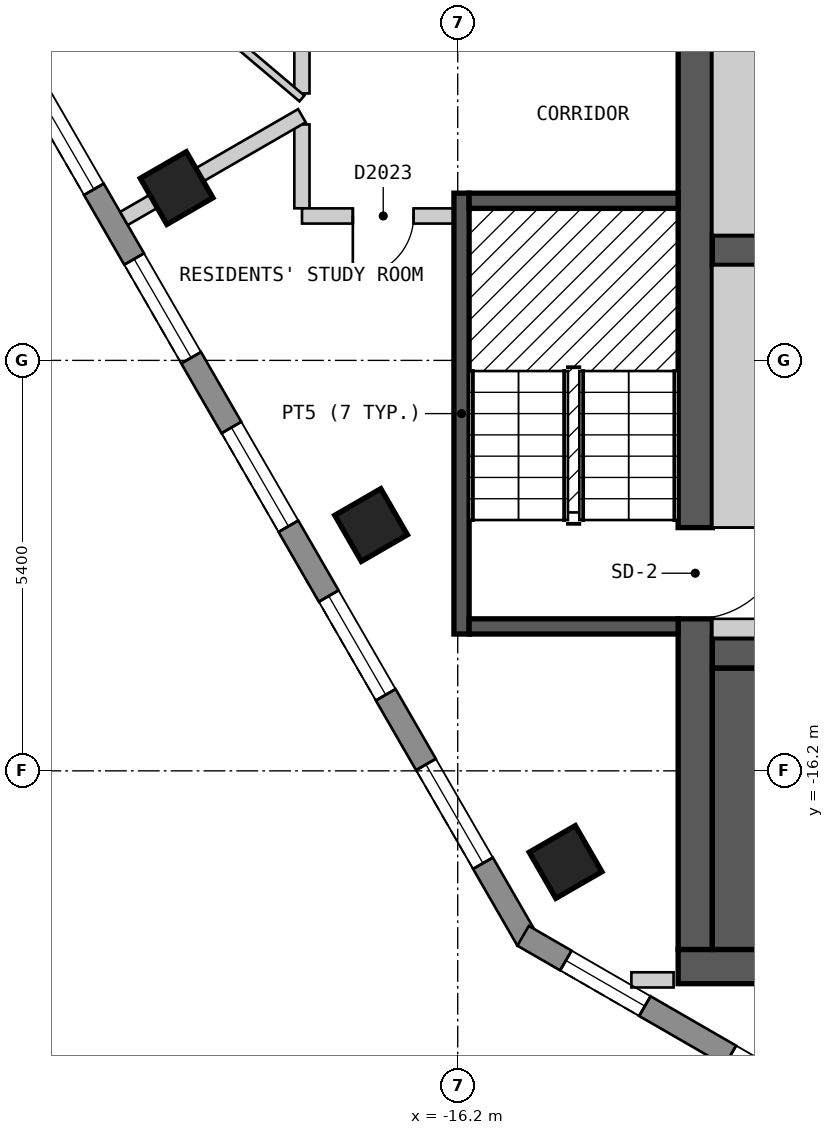
"""IFC4 building model, lengths in metres.
Left out: names, types, materials, properties, quantities, classifications, styles, units other than length and angle.
Written with IfcOpenShell. Run it as: python <this file> out.ifc"""

import sys

from ifc_helpers import new_model, si_unit, direction, frame, frame_2d, origin, origin_2d, place, context, subcontext, project, spatial, polyline, rectangle, outline, extrude, element, fill, save


model = new_model("IFC4")
c1 = context("Model", 3, precision=1e-05, world=origin(), true_north=direction((0.0, 1.0)))
c2 = subcontext(c1, "Body", "Model", "MODEL_VIEW")
j1 = project(units=[si_unit("LENGTHUNIT", "METRE"), si_unit("PLANEANGLEUNIT", "RADIAN")], contexts=[c1])
p1 = place(None, origin())
s1 = spatial("IfcSite", under=j1, at=p1, CompositionType="ELEMENT")
p2 = place(p1, origin())
s2 = spatial("IfcBuilding", under=s1, at=p2, CompositionType="ELEMENT")
p3 = place(p2, frame((0.0, 0.0, 238.8)))
s3 = spatial("IfcBuildingStorey", under=s2, at=p3, CompositionType="ELEMENT", Elevation=238.8)
for number, where, z_axis, x_axis in (
    (1, (-19.899, -8.533, 0.0), (0.0, 0.0, 1.0), (0.5, -0.866, 0.0)),
    (2, (-17.34, -12.966, 0.0), (0.0, 0.0, 1.0), (0.5, -0.866, 0.0)),
    (3, (-14.781, -17.399, 0.0), (0.0, 0.0, 1.0), (0.5, -0.866, 0.0)),
):
    element("IfcColumn", number, at=place(p3, frame(where, z_axis=z_axis, x_axis=x_axis)), inside=s3, PredefinedType="COLUMN", context=c2, shape_type="SweptSolid", body=[
        extrude(rectangle(XDim=0.7, YDim=0.7, at=origin_2d()), origin(), (0.0, 0.0, 1.0), 3.0),
    ])
p4 = place(p3, frame((-13.3, -18.775, 0.0), z_axis=(0.0, 0.0, 1.0), x_axis=(1.0, 0.0, 0.0)))
e4 = element("IfcWall", 4, at=p4, inside=s3, PredefinedType="SHEAR", context=c2, shape_type="SweptSolid", body=[
    extrude(rectangle(XDim=26.6, YDim=0.45, at=frame_2d((13.3, 0.0))), origin(), (0.0, 0.0, 1.0), 2.7),
])
p5 = place(p4, frame((10.25, 0.0, 0.0)))
e5 = element("IfcOpeningElement", 5, at=p5, cuts=e4, PredefinedType="OPENING", context=c2, shape_type="SweptSolid", body=[
    extrude(rectangle(XDim=0.9, YDim=2.1, at=frame_2d((0.45, 1.05))), frame((0.0, 0.235, 0.0), z_axis=(0.0, -1.0, 0.0), x_axis=(1.0, 0.0, 0.0)), (0.0, 0.0, 1.0), 0.47),
])
p6 = place(p3, frame((-13.075, -18.55, 0.0), z_axis=(0.0, 0.0, 1.0), x_axis=(0.0, 1.0, 0.0)))
e6 = element("IfcWall", 6, at=p6, inside=s3, PredefinedType="SHEAR", context=c2, shape_type="SweptSolid", body=[
    extrude(rectangle(XDim=13.1, YDim=0.45, at=frame_2d((6.55, 0.0))), origin(), (0.0, 0.0, 1.0), 2.7),
])
p7 = place(p6, frame((4.35, 0.0, 0.0)))
e7 = element("IfcOpeningElement", 7, at=p7, cuts=e6, PredefinedType="OPENING", context=c2, shape_type="SweptSolid", body=[
    extrude(rectangle(XDim=1.2, YDim=2.1, at=frame_2d((0.6, 1.05))), frame((0.0, 0.235, 0.0), z_axis=(0.0, -1.0, 0.0), x_axis=(1.0, 0.0, 0.0)), (0.0, 0.0, 1.0), 0.47),
])
p8 = place(p3, frame((-12.85, -14.65, 0.0), z_axis=(0.0, 0.0, 1.0), x_axis=(1.0, 0.0, 0.0)))
e8 = element("IfcWall", 8, at=p8, inside=s3, PredefinedType="SHEAR", context=c2, shape_type="SweptSolid", body=[
    extrude(rectangle(XDim=25.7, YDim=0.4, at=frame_2d((12.85, 0.0))), origin(), (0.0, 0.0, 1.0), 2.7),
])
p9 = place(p8, frame((2.05, 0.0, 0.0), z_axis=(0.0, 0.0, 1.0), x_axis=(-1.0, 0.0, 0.0)))
e9 = element("IfcOpeningElement", 9, at=p9, cuts=e8, PredefinedType="OPENING", context=c2, shape_type="SweptSolid", body=[
    extrude(rectangle(XDim=1.2, YDim=2.1, at=frame_2d((0.6, 1.05))), frame((0.0, 0.21, 0.0), z_axis=(0.0, -1.0, 0.0), x_axis=(1.0, 0.0, 0.0)), (0.0, 0.0, 1.0), 0.42),
])
p10 = place(p8, frame((24.9, 0.0, 0.0), z_axis=(0.0, 0.0, 1.0), x_axis=(-1.0, 0.0, 0.0)))
e10 = element("IfcOpeningElement", 10, at=p10, cuts=e8, PredefinedType="OPENING", context=c2, shape_type="SweptSolid", body=[
    extrude(rectangle(XDim=1.2, YDim=2.1, at=frame_2d((0.6, 1.05))), frame((0.0, 0.21, 0.0), z_axis=(0.0, -1.0, 0.0), x_axis=(1.0, 0.0, 0.0)), (0.0, 0.0, 1.0), 0.42),
])
p11 = place(p8, frame((10.0, 0.0, 0.0), z_axis=(0.0, 0.0, 1.0), x_axis=(-1.0, 0.0, 0.0)))
e11 = element("IfcOpeningElement", 11, at=p11, cuts=e8, PredefinedType="OPENING", context=c2, shape_type="SweptSolid", body=[
    extrude(rectangle(XDim=1.0, YDim=2.1, at=frame_2d((0.5, 1.05))), frame((0.0, 0.21, 0.0), z_axis=(0.0, -1.0, 0.0), x_axis=(1.0, 0.0, 0.0)), (0.0, 0.0, 1.0), 0.42),
])
p12 = place(p8, frame((16.4, 0.0, 0.0), z_axis=(0.0, 0.0, 1.0), x_axis=(-1.0, 0.0, 0.0)))
e12 = element("IfcOpeningElement", 12, at=p12, cuts=e8, PredefinedType="OPENING", context=c2, shape_type="SweptSolid", body=[
    extrude(rectangle(XDim=1.0, YDim=2.1, at=frame_2d((0.5, 1.05))), frame((0.0, 0.21, 0.0), z_axis=(0.0, -1.0, 0.0), x_axis=(1.0, 0.0, 0.0)), (0.0, 0.0, 1.0), 0.42),
])
p13 = place(p3, frame((-12.85, -9.35, 0.0), z_axis=(0.0, 0.0, 1.0), x_axis=(1.0, 0.0, 0.0)))
e13 = element("IfcWall", 13, at=p13, inside=s3, PredefinedType="SHEAR", context=c2, shape_type="SweptSolid", body=[
    extrude(rectangle(XDim=23.05, YDim=0.4, at=frame_2d((11.525, 0.0))), origin(), (0.0, 0.0, 1.0), 2.7),
])
p14 = place(p13, frame((1.45, 0.0, 0.0)))
e14 = element("IfcOpeningElement", 14, at=p14, cuts=e13, PredefinedType="OPENING", context=c2, shape_type="SweptSolid", body=[
    extrude(rectangle(XDim=1.1, YDim=2.1, at=frame_2d((0.55, 1.05))), frame((0.0, 0.21, 0.0), z_axis=(0.0, -1.0, 0.0), x_axis=(1.0, 0.0, 0.0)), (0.0, 0.0, 1.0), 0.42),
])
p15 = place(p13, frame((4.25, 0.0, 0.0)))
e15 = element("IfcOpeningElement", 15, at=p15, cuts=e13, PredefinedType="OPENING", context=c2, shape_type="SweptSolid", body=[
    extrude(rectangle(XDim=1.1, YDim=2.1, at=frame_2d((0.55, 1.05))), frame((0.0, 0.21, 0.0), z_axis=(0.0, -1.0, 0.0), x_axis=(1.0, 0.0, 0.0)), (0.0, 0.0, 1.0), 0.42),
])
p16 = place(p13, frame((7.05, 0.0, 0.0)))
e16 = element("IfcOpeningElement", 16, at=p16, cuts=e13, PredefinedType="OPENING", context=c2, shape_type="SweptSolid", body=[
    extrude(rectangle(XDim=1.1, YDim=2.1, at=frame_2d((0.55, 1.05))), frame((0.0, 0.21, 0.0), z_axis=(0.0, -1.0, 0.0), x_axis=(1.0, 0.0, 0.0)), (0.0, 0.0, 1.0), 0.42),
])
p17 = place(p13, frame((9.35, 0.0, 0.0)))
e17 = element("IfcOpeningElement", 17, at=p17, cuts=e13, PredefinedType="OPENING", context=c2, shape_type="SweptSolid", body=[
    extrude(rectangle(XDim=1.1, YDim=2.1, at=frame_2d((0.55, 1.05))), frame((0.0, 0.21, 0.0), z_axis=(0.0, -1.0, 0.0), x_axis=(1.0, 0.0, 0.0)), (0.0, 0.0, 1.0), 0.42),
])
p18 = place(p13, frame((11.65, 0.0, 0.0)))
e18 = element("IfcOpeningElement", 18, at=p18, cuts=e13, PredefinedType="OPENING", context=c2, shape_type="SweptSolid", body=[
    extrude(rectangle(XDim=1.1, YDim=2.1, at=frame_2d((0.55, 1.05))), frame((0.0, 0.21, 0.0), z_axis=(0.0, -1.0, 0.0), x_axis=(1.0, 0.0, 0.0)), (0.0, 0.0, 1.0), 0.42),
])
p19 = place(p13, frame((13.95, 0.0, 0.0)))
e19 = element("IfcOpeningElement", 19, at=p19, cuts=e13, PredefinedType="OPENING", context=c2, shape_type="SweptSolid", body=[
    extrude(rectangle(XDim=1.1, YDim=2.1, at=frame_2d((0.55, 1.05))), frame((0.0, 0.21, 0.0), z_axis=(0.0, -1.0, 0.0), x_axis=(1.0, 0.0, 0.0)), (0.0, 0.0, 1.0), 0.42),
])
p20 = place(p13, frame((16.25, 0.0, 0.0)))
e20 = element("IfcOpeningElement", 20, at=p20, cuts=e13, PredefinedType="OPENING", context=c2, shape_type="SweptSolid", body=[
    extrude(rectangle(XDim=1.1, YDim=2.1, at=frame_2d((0.55, 1.05))), frame((0.0, 0.21, 0.0), z_axis=(0.0, -1.0, 0.0), x_axis=(1.0, 0.0, 0.0)), (0.0, 0.0, 1.0), 0.42),
])
p21 = place(p13, frame((18.55, 0.0, 0.0)))
e21 = element("IfcOpeningElement", 21, at=p21, cuts=e13, PredefinedType="OPENING", context=c2, shape_type="SweptSolid", body=[
    extrude(rectangle(XDim=1.1, YDim=2.1, at=frame_2d((0.55, 1.05))), frame((0.0, 0.21, 0.0), z_axis=(0.0, -1.0, 0.0), x_axis=(1.0, 0.0, 0.0)), (0.0, 0.0, 1.0), 0.42),
])
p22 = place(p13, frame((20.95, 0.0, 0.0)))
e22 = element("IfcOpeningElement", 22, at=p22, cuts=e13, PredefinedType="OPENING", context=c2, shape_type="SweptSolid", body=[
    extrude(rectangle(XDim=1.1, YDim=2.1, at=frame_2d((0.55, 1.05))), frame((0.0, 0.21, 0.0), z_axis=(0.0, -1.0, 0.0), x_axis=(1.0, 0.0, 0.0)), (0.0, 0.0, 1.0), 0.42),
])
p23 = place(p3, frame((-23.599, -4.025, 0.0), z_axis=(0.0, 0.0, 1.0), x_axis=(0.500012653391, -0.866018098222, 0.0)))
e23 = element("IfcWall", 23, at=p23, inside=s3, PredefinedType="SOLIDWALL", context=c2, shape_type="SweptSolid", body=[
    extrude(outline(polyline([(0.0, -0.15), (16.628, -0.15), (16.548, 0.15), (0.08, 0.15), (0.0, -0.15)])), origin(), (0.0, 0.0, 1.0), 2.7),
])
p24 = place(p23, frame((1.164, 0.0, 0.15)))
e24 = element("IfcOpeningElement", 24, at=p24, cuts=e23, PredefinedType="OPENING", context=c2, shape_type="SweptSolid", body=[
    extrude(rectangle(XDim=1.5, YDim=2.1, at=frame_2d((0.75, 1.05))), frame((0.0, 0.16, 0.0), z_axis=(0.0, -1.0, 0.0), x_axis=(1.0, 0.0, 0.0)), (0.0, 0.0, 1.0), 0.32),
])
p25 = place(p23, frame((3.724, 0.0, 0.15)))
e25 = element("IfcOpeningElement", 25, at=p25, cuts=e23, PredefinedType="OPENING", context=c2, shape_type="SweptSolid", body=[
    extrude(rectangle(XDim=1.5, YDim=2.1, at=frame_2d((0.75, 1.05))), frame((0.0, 0.16, 0.0), z_axis=(0.0, -1.0, 0.0), x_axis=(1.0, 0.0, 0.0)), (0.0, 0.0, 1.0), 0.32),
])
p26 = place(p23, frame((6.283, 0.0, 0.15)))
e26 = element("IfcOpeningElement", 26, at=p26, cuts=e23, PredefinedType="OPENING", context=c2, shape_type="SweptSolid", body=[
    extrude(rectangle(XDim=1.5, YDim=2.1, at=frame_2d((0.75, 1.05))), frame((0.0, 0.16, 0.0), z_axis=(0.0, -1.0, 0.0), x_axis=(1.0, 0.0, 0.0)), (0.0, 0.0, 1.0), 0.32),
])
p27 = place(p23, frame((8.843, 0.0, 0.15)))
e27 = element("IfcOpeningElement", 27, at=p27, cuts=e23, PredefinedType="OPENING", context=c2, shape_type="SweptSolid", body=[
    extrude(rectangle(XDim=1.5, YDim=2.1, at=frame_2d((0.75, 1.05))), frame((0.0, 0.16, 0.0), z_axis=(0.0, -1.0, 0.0), x_axis=(1.0, 0.0, 0.0)), (0.0, 0.0, 1.0), 0.32),
])
p28 = place(p23, frame((11.403, 0.0, 0.15)))
e28 = element("IfcOpeningElement", 28, at=p28, cuts=e23, PredefinedType="OPENING", context=c2, shape_type="SweptSolid", body=[
    extrude(rectangle(XDim=1.5, YDim=2.1, at=frame_2d((0.75, 1.05))), frame((0.0, 0.16, 0.0), z_axis=(0.0, -1.0, 0.0), x_axis=(1.0, 0.0, 0.0)), (0.0, 0.0, 1.0), 0.32),
])
p29 = place(p23, frame((13.962, 0.0, 0.15)))
e29 = element("IfcOpeningElement", 29, at=p29, cuts=e23, PredefinedType="OPENING", context=c2, shape_type="SweptSolid", body=[
    extrude(rectangle(XDim=1.5, YDim=2.1, at=frame_2d((0.75, 1.05))), frame((0.0, 0.16, 0.0), z_axis=(0.0, -1.0, 0.0), x_axis=(1.0, 0.0, 0.0)), (0.0, 0.0, 1.0), 0.32),
])
p30 = place(p3, frame((-15.34, -18.37, 0.0), z_axis=(0.0, 0.0, 1.0), x_axis=(0.866022959057, -0.500004234368, 0.0)))
e30 = element("IfcWall", 30, at=p30, inside=s3, PredefinedType="SOLIDWALL", context=c2, shape_type="SweptSolid", body=[
    extrude(outline(polyline([(0.0, -0.15), (5.0, -0.15), (4.92, 0.15), (0.08, 0.15), (0.0, -0.15)])), origin(), (0.0, 0.0, 1.0), 2.7),
])
p31 = place(p30, frame((0.65, 0.0, 0.15)))
e31 = element("IfcOpeningElement", 31, at=p31, cuts=e30, PredefinedType="OPENING", context=c2, shape_type="SweptSolid", body=[
    extrude(rectangle(XDim=1.2, YDim=2.1, at=frame_2d((0.6, 1.05))), frame((0.0, 0.16, 0.0), z_axis=(0.0, -1.0, 0.0), x_axis=(1.0, 0.0, 0.0)), (0.0, 0.0, 1.0), 0.32),
])
p32 = place(p30, frame((3.15, 0.0, 0.15)))
e32 = element("IfcOpeningElement", 32, at=p32, cuts=e30, PredefinedType="OPENING", context=c2, shape_type="SweptSolid", body=[
    extrude(rectangle(XDim=1.2, YDim=2.1, at=frame_2d((0.6, 1.05))), frame((0.0, 0.16, 0.0), z_axis=(0.0, -1.0, 0.0), x_axis=(1.0, 0.0, 0.0)), (0.0, 0.0, 1.0), 0.32),
])
p33 = place(p3, frame((-18.25, -7.696, 0.0), z_axis=(0.0, 0.0, 1.0), x_axis=(0.0, -1.0, 0.0)))
e33 = element("IfcWall", 33, at=p33, inside=s3, PredefinedType="PARTITIONING", context=c2, shape_type="SweptSolid", body=[
    extrude(rectangle(XDim=1.103, YDim=0.2, at=frame_2d((0.552, 0.0))), origin(), (0.0, 0.0, 1.0), 2.7),
])
p34 = place(p3, frame((-18.249, -8.9, 0.0), z_axis=(0.0, 0.0, 1.0), x_axis=(1.0, 0.0, 0.0)))
e34 = element("IfcWall", 34, at=p34, inside=s3, PredefinedType="PARTITIONING", context=c2, shape_type="SweptSolid", body=[
    extrude(rectangle(XDim=2.199, YDim=0.2, at=frame_2d((1.1, 0.0))), origin(), (0.0, 0.0, 1.0), 2.7),
])
p35 = place(p34, frame((0.669, 0.0, 0.0)))
e35 = element("IfcOpeningElement", 35, at=p35, cuts=e34, PredefinedType="OPENING", context=c2, shape_type="SweptSolid", body=[
    extrude(rectangle(XDim=0.8, YDim=2.1, at=frame_2d((0.4, 1.05))), frame((0.0, 0.11, 0.0), z_axis=(0.0, -1.0, 0.0), x_axis=(1.0, 0.0, 0.0)), (0.0, 0.0, 1.0), 0.22),
])
p36 = place(p3, frame((-18.25, -7.288, 0.0), z_axis=(0.0, 0.0, 1.0), x_axis=(0.0, 1.0, 0.0)))
e36 = element("IfcWall", 36, at=p36, inside=s3, PredefinedType="PARTITIONING", context=c2, shape_type="SweptSolid", body=[
    extrude(rectangle(XDim=0.687, YDim=0.2, at=frame_2d((0.344, 0.0))), origin(), (0.0, 0.0, 1.0), 2.7),
])
p37 = place(p3, frame((-20.103, -5.787, 0.0), z_axis=(0.0, 0.0, 1.0), x_axis=(0.763599944726, -0.645689650231, 0.0)))
e37 = element("IfcWall", 37, at=p37, inside=s3, PredefinedType="PARTITIONING", context=c2, shape_type="SweptSolid", body=[
    extrude(rectangle(XDim=2.427, YDim=0.1, at=frame_2d((1.213, 0.0))), origin(), (0.0, 0.0, 1.0), 2.7),
])
p38 = place(p3, frame((-13.915, -18.95, 0.0), z_axis=(0.0, 0.0, 1.0), x_axis=(1.0, 0.0, 0.0)))
e38 = element("IfcWall", 38, at=p38, inside=s3, PredefinedType="PARTITIONING", context=c2, shape_type="SweptSolid", body=[
    extrude(rectangle(XDim=0.555, YDim=0.2, at=frame_2d((0.277, 0.0))), origin(), (0.0, 0.0, 1.0), 2.7),
])
p39 = place(p3, frame((-20.592, -8.933, 0.0), z_axis=(0.0, 0.0, 1.0), x_axis=(0.866045775131, 0.499964714133, 0.0)))
e39 = element("IfcWall", 39, at=p39, inside=s3, PredefinedType="PARTITIONING", context=c2, shape_type="SweptSolid", body=[
    extrude(rectangle(XDim=2.704, YDim=0.2, at=frame_2d((1.352, 0.0))), origin(), (0.0, 0.0, 1.0), 2.7),
])
p40 = place(p3, frame((-16.15, -14.4, 0.0), z_axis=(0.0, 0.0, 1.0), x_axis=(0.0, 1.0, 0.0)))
e40 = element("IfcWall", 40, at=p40, inside=s3, PredefinedType="SOLIDWALL", context=c2, shape_type="SweptSolid", body=[
    extrude(rectangle(XDim=5.8, YDim=0.2, at=frame_2d((2.9, 0.0))), origin(), (0.0, 0.0, 1.0), 2.7),
])
for number, where, z_axis, x_axis in (
    (41, (-16.05, -14.3, 0.0), (0.0, 0.0, 1.0), (1.0, 0.0, 0.0)),
    (42, (-16.05, -8.7, 0.0), (0.0, 0.0, 1.0), (1.0, 0.0, 0.0)),
):
    element("IfcWall", number, at=place(p3, frame(where, z_axis=z_axis, x_axis=x_axis)), inside=s3, PredefinedType="SOLIDWALL", context=c2, shape_type="SweptSolid", body=[
        extrude(rectangle(XDim=2.75, YDim=0.2, at=frame_2d((1.375, 0.0))), origin(), (0.0, 0.0, 1.0), 2.7),
    ])
p41 = place(p3, frame((-12.475, -18.55, 0.0), z_axis=(0.0, 0.0, 1.0), x_axis=(0.0, 1.0, 0.0)))
e43 = element("IfcWall", 43, at=p41, inside=s3, PredefinedType="SOLIDWALL", context=c2, shape_type="SweptSolid", body=[
    extrude(rectangle(XDim=3.7, YDim=0.75, at=frame_2d((1.85, 0.0))), origin(), (0.0, 0.0, 1.0), 2.7),
])
p42 = place(p3, frame((-12.85, -14.325, 0.0), z_axis=(0.0, 0.0, 1.0), x_axis=(1.0, 0.0, 0.0)))
e44 = element("IfcWall", 44, at=p42, inside=s3, PredefinedType="PARTITIONING", context=c2, shape_type="SweptSolid", body=[
    extrude(rectangle(XDim=0.75, YDim=0.25, at=frame_2d((0.375, 0.0))), origin(), (0.0, 0.0, 1.0), 2.7),
])
p43 = place(p3, frame((-12.475, -13.0, 0.0), z_axis=(0.0, 0.0, 1.0), x_axis=(0.0, 1.0, 0.0)))
e45 = element("IfcWall", 45, at=p43, inside=s3, PredefinedType="PARTITIONING", context=c2, shape_type="SweptSolid", body=[
    extrude(rectangle(XDim=3.45, YDim=0.75, at=frame_2d((1.725, 0.0))), origin(), (0.0, 0.0, 1.0), 2.7),
])
p44 = place(p3, frame((-12.475, -9.15, 0.0), z_axis=(0.0, 0.0, 1.0), x_axis=(0.0, 1.0, 0.0)))
e46 = element("IfcWall", 46, at=p44, inside=s3, PredefinedType="SOLIDWALL", context=c2, shape_type="SweptSolid", body=[
    extrude(rectangle(XDim=3.7, YDim=0.75, at=frame_2d((1.85, 0.0))), origin(), (0.0, 0.0, 1.0), 2.7),
])
p45 = place(p25, origin())
e47 = element("IfcWindow", 47, at=p45, inside=s3, PartitioningType="SINGLE_PANEL", PredefinedType="WINDOW", context=c2, shape_type="SweptSolid", body=[
    extrude(rectangle(XDim=1.5, YDim=2.1, at=frame_2d((0.75, 1.05))), frame((0.0, 0.03, 0.0), z_axis=(0.0, -1.0, 0.0), x_axis=(1.0, 0.0, 0.0)), (0.0, 0.0, 1.0), 0.06),
])
fill(e25, e47)
p46 = place(p26, origin())
e48 = element("IfcWindow", 48, at=p46, inside=s3, PartitioningType="SINGLE_PANEL", PredefinedType="WINDOW", context=c2, shape_type="SweptSolid", body=[
    extrude(rectangle(XDim=1.5, YDim=2.1, at=frame_2d((0.75, 1.05))), frame((0.0, 0.03, 0.0), z_axis=(0.0, -1.0, 0.0), x_axis=(1.0, 0.0, 0.0)), (0.0, 0.0, 1.0), 0.06),
])
fill(e26, e48)
p47 = place(p27, origin())
e49 = element("IfcWindow", 49, at=p47, inside=s3, PartitioningType="SINGLE_PANEL", PredefinedType="WINDOW", context=c2, shape_type="SweptSolid", body=[
    extrude(rectangle(XDim=1.5, YDim=2.1, at=frame_2d((0.75, 1.05))), frame((0.0, 0.03, 0.0), z_axis=(0.0, -1.0, 0.0), x_axis=(1.0, 0.0, 0.0)), (0.0, 0.0, 1.0), 0.06),
])
fill(e27, e49)
p48 = place(p28, origin())
e50 = element("IfcWindow", 50, at=p48, inside=s3, PartitioningType="SINGLE_PANEL", PredefinedType="WINDOW", context=c2, shape_type="SweptSolid", body=[
    extrude(rectangle(XDim=1.5, YDim=2.1, at=frame_2d((0.75, 1.05))), frame((0.0, 0.03, 0.0), z_axis=(0.0, -1.0, 0.0), x_axis=(1.0, 0.0, 0.0)), (0.0, 0.0, 1.0), 0.06),
])
fill(e28, e50)
p49 = place(p29, origin())
e51 = element("IfcWindow", 51, at=p49, inside=s3, PartitioningType="SINGLE_PANEL", PredefinedType="WINDOW", context=c2, shape_type="SweptSolid", body=[
    extrude(rectangle(XDim=1.5, YDim=2.1, at=frame_2d((0.75, 1.05))), frame((0.0, 0.03, 0.0), z_axis=(0.0, -1.0, 0.0), x_axis=(1.0, 0.0, 0.0)), (0.0, 0.0, 1.0), 0.06),
])
fill(e29, e51)
p50 = place(p31, origin())
e52 = element("IfcWindow", 52, at=p50, inside=s3, PartitioningType="SINGLE_PANEL", PredefinedType="WINDOW", context=c2, shape_type="SweptSolid", body=[
    extrude(rectangle(XDim=1.2, YDim=2.1, at=frame_2d((0.6, 1.05))), frame((0.0, 0.03, 0.0), z_axis=(0.0, -1.0, 0.0), x_axis=(1.0, 0.0, 0.0)), (0.0, 0.0, 1.0), 0.06),
])
fill(e31, e52)
p51 = place(p32, origin())
e53 = element("IfcWindow", 53, at=p51, inside=s3, PartitioningType="SINGLE_PANEL", PredefinedType="WINDOW", context=c2, shape_type="SweptSolid", body=[
    extrude(rectangle(XDim=1.2, YDim=2.1, at=frame_2d((0.6, 1.05))), frame((0.0, 0.03, 0.0), z_axis=(0.0, -1.0, 0.0), x_axis=(1.0, 0.0, 0.0)), (0.0, 0.0, 1.0), 0.06),
])
fill(e32, e53)
p52 = place(p35, origin())
e54 = element("IfcDoor", 54, at=p52, inside=s3, OperationType="SINGLE_SWING_LEFT", PredefinedType="DOOR", context=c2, shape_type="SweptSolid", body=[
    extrude(rectangle(XDim=0.8, YDim=2.1, at=frame_2d((0.4, 1.05))), frame((0.0, 0.025, 0.0), z_axis=(0.0, -1.0, 0.0), x_axis=(1.0, 0.0, 0.0)), (0.0, 0.0, 1.0), 0.05),
])
fill(e35, e54)
p53 = place(p7, origin())
e55 = element("IfcDoor", 55, at=p53, inside=s3, OperationType="SINGLE_SWING_RIGHT", PredefinedType="DOOR", context=c2, shape_type="SweptSolid", body=[
    extrude(rectangle(XDim=1.2, YDim=2.1, at=frame_2d((0.6, 1.05))), frame((0.0, 0.025, 0.0), z_axis=(0.0, -1.0, 0.0), x_axis=(1.0, 0.0, 0.0)), (0.0, 0.0, 1.0), 0.05),
])
fill(e7, e55)
save(model, sys.argv[1])
